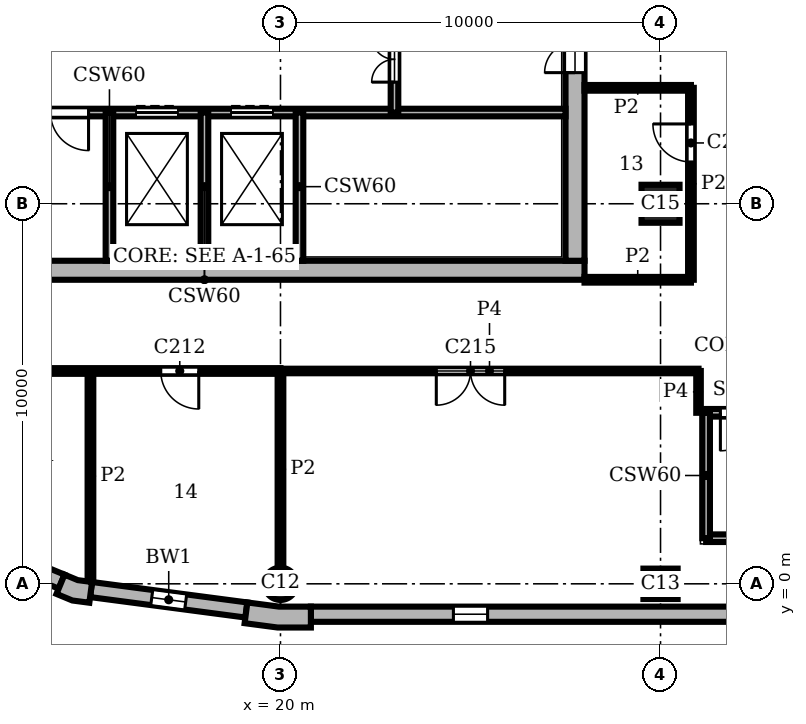
"""IFC4 building model, lengths in metres.
Left out: names, types, materials, properties, quantities, classifications, styles, units other than length and angle.
Written with IfcOpenShell. Run it as: python <this file> out.ifc"""

import sys

from ifc_helpers import new_model, si_unit, direction, frame, frame_2d, origin, origin_2d, place, context, subcontext, project, spatial, polyline, rectangle, circle, outline, extrude, element, fill, save


model = new_model("IFC4")
c1 = context("Model", 3, precision=1e-05, world=origin(), true_north=direction((0.0, 1.0)))
c2 = subcontext(c1, "Body", "Model", "MODEL_VIEW")
j1 = project(units=[si_unit("LENGTHUNIT", "METRE"), si_unit("PLANEANGLEUNIT", "RADIAN")], contexts=[c1])
p1 = place(None, origin())
s1 = spatial("IfcSite", under=j1, at=p1, CompositionType="ELEMENT")
p2 = place(p1, origin())
s2 = spatial("IfcBuilding", under=s1, at=p2, CompositionType="ELEMENT")
p3 = place(p2, frame((0.0, 0.0, 263.1)))
s3 = spatial("IfcBuildingStorey", under=s2, at=p3, CompositionType="ELEMENT", Elevation=263.1)
p4 = place(p3, frame((20.0, 0.0, 0.0), z_axis=(0.0, 0.0, 1.0), x_axis=(1.0, 0.0, 0.0)))
e1 = element("IfcColumn", 1, at=p4, inside=s3, PredefinedType="COLUMN", context=c2, shape_type="SweptSolid", body=[
    extrude(circle(Radius=0.425, at=origin_2d()), origin(), (0.0, 0.0, 1.0), 3.9),
])
p5 = place(p3, frame((30.0, 0.0, 0.0), z_axis=(0.0, 0.0, 1.0), x_axis=(1.0, 0.0, 0.0)))
e2 = element("IfcColumn", 2, at=p5, inside=s3, PredefinedType="COLUMN", context=c2, shape_type="SweptSolid", body=[
    extrude(rectangle(XDim=0.9, YDim=0.8, at=origin_2d()), origin(), (0.0, 0.0, 1.0), 3.9),
])
p6 = place(p3, frame((30.0, 10.0, 0.0), z_axis=(0.0, 0.0, 1.0), x_axis=(1.0, 0.0, 0.0)))
e3 = element("IfcColumn", 3, at=p6, inside=s3, PredefinedType="COLUMN", context=c2, shape_type="SweptSolid", body=[
    extrude(rectangle(XDim=1.0, YDim=1.0, at=origin_2d()), origin(), (0.0, 0.0, 1.0), 3.9),
])
p7 = place(p3, frame((8.0, 8.25, 0.0), z_axis=(0.0, 0.0, 1.0), x_axis=(1.0, 0.0, 0.0)))
e4 = element("IfcWall", 4, at=p7, inside=s3, PredefinedType="SHEAR", context=c2, shape_type="SweptSolid", body=[
    extrude(rectangle(XDim=20.0, YDim=0.5, at=frame_2d((10.0, 0.0))), origin(), (0.0, 0.0, 1.0), 3.9),
])
p8 = place(p3, frame((27.75, 8.5, 0.0), z_axis=(0.0, 0.0, 1.0), x_axis=(0.0, 1.0, 0.0)))
e5 = element("IfcWall", 5, at=p8, inside=s3, PredefinedType="SHEAR", context=c2, shape_type="SweptSolid", body=[
    extrude(rectangle(XDim=19.0, YDim=0.5, at=frame_2d((9.5, 0.0))), origin(), (0.0, 0.0, 1.0), 3.9),
])
p9 = place(p8, frame((4.95, 0.0, 0.0)))
e6 = element("IfcOpeningElement", 6, at=p9, cuts=e5, PredefinedType="OPENING", context=c2, shape_type="SweptSolid", body=[
    extrude(rectangle(XDim=1.6, YDim=2.1, at=frame_2d((0.8, 1.05))), frame((0.0, 0.26, 0.0), z_axis=(0.0, -1.0, 0.0), x_axis=(1.0, 0.0, 0.0)), (0.0, 0.0, 1.0), 0.52),
])
p10 = place(p3, origin())
e7 = element("IfcWall", 7, at=p10, inside=s3, PredefinedType="SOLIDWALL", context=c2, shape_type="SweptSolid", body=[
    extrude(outline(polyline([(19.076, -0.887), (19.057, -1.036), (19.925, -1.15), (20.8, -1.15), (20.8, -1.0), (20.8, -0.6), (19.961, -0.6), (19.128, -0.49), (19.076, -0.887)])), origin(), (0.0, 0.0, 1.0), 3.9),
])
e8 = element("IfcWall", 8, at=p10, inside=s3, PredefinedType="SOLIDWALL", context=c2, shape_type="SweptSolid", body=[
    extrude(outline(polyline([(14.164, -0.128), (14.106, -0.266), (14.523, -0.439), (14.971, -0.498), (14.99, -0.349), (15.043, 0.047), (14.667, 0.097), (14.317, 0.242), (14.164, -0.128)])), origin(), (0.0, 0.0, 1.0), 3.9),
])
p11 = place(p3, frame((20.8, -0.8, 0.0), z_axis=(0.0, 0.0, 1.0), x_axis=(1.0, 0.0, 0.0)))
e9 = element("IfcWall", 9, at=p11, inside=s3, PredefinedType="SOLIDWALL", context=c2, shape_type="SweptSolid", body=[
    extrude(rectangle(XDim=28.4, YDim=0.4, at=frame_2d((14.2, 0.0))), origin(), (0.0, 0.0, 1.0), 3.9),
])
p12 = place(p11, frame((3.75, 0.0, 0.9)))
e10 = element("IfcOpeningElement", 10, at=p12, cuts=e9, PredefinedType="OPENING", context=c2, shape_type="SweptSolid", body=[
    extrude(rectangle(XDim=0.9, YDim=2.35, at=frame_2d((0.45, 1.175))), frame((0.0, 0.21, 0.0), z_axis=(0.0, -1.0, 0.0), x_axis=(1.0, 0.0, 0.0)), (0.0, 0.0, 1.0), 0.42),
])
p13 = place(p11, frame((13.75, 0.0, 0.9)))
e11 = element("IfcOpeningElement", 11, at=p13, cuts=e9, PredefinedType="OPENING", context=c2, shape_type="SweptSolid", body=[
    extrude(rectangle(XDim=0.9, YDim=2.35, at=frame_2d((0.45, 1.175))), frame((0.0, 0.21, 0.0), z_axis=(0.0, -1.0, 0.0), x_axis=(1.0, 0.0, 0.0)), (0.0, 0.0, 1.0), 0.42),
])
p14 = place(p11, frame((23.75, 0.0, 0.9)))
e12 = element("IfcOpeningElement", 12, at=p14, cuts=e9, PredefinedType="OPENING", context=c2, shape_type="SweptSolid", body=[
    extrude(rectangle(XDim=0.9, YDim=2.35, at=frame_2d((0.45, 1.175))), frame((0.0, 0.21, 0.0), z_axis=(0.0, -1.0, 0.0), x_axis=(1.0, 0.0, 0.0)), (0.0, 0.0, 1.0), 0.42),
])
p15 = place(p3, frame((10.433, 1.634, 0.0), z_axis=(0.0, 0.0, 1.0), x_axis=(0.923863744394, -0.382721546029, 0.0)))
e13 = element("IfcWall", 13, at=p15, inside=s3, PredefinedType="SOLIDWALL", context=c2, shape_type="SweptSolid", body=[
    extrude(rectangle(XDim=4.121, YDim=0.4, at=frame_2d((2.061, 0.0))), origin(), (0.0, 0.0, 1.0), 3.9),
])
p16 = place(p15, frame((1.611, 0.0, 0.9)))
e14 = element("IfcOpeningElement", 14, at=p16, cuts=e13, PredefinedType="OPENING", context=c2, shape_type="SweptSolid", body=[
    extrude(rectangle(XDim=0.9, YDim=2.35, at=frame_2d((0.45, 1.175))), frame((0.0, 0.21, 0.0), z_axis=(0.0, -1.0, 0.0), x_axis=(1.0, 0.0, 0.0)), (0.0, 0.0, 1.0), 0.42),
])
p17 = place(p3, frame((15.017, -0.151, 0.0), z_axis=(0.0, 0.0, 1.0), x_axis=(0.991446429508, -0.130514280502, 0.0)))
e15 = element("IfcWall", 15, at=p17, inside=s3, PredefinedType="SOLIDWALL", context=c2, shape_type="SweptSolid", body=[
    extrude(rectangle(XDim=4.121, YDim=0.4, at=frame_2d((2.061, 0.0))), origin(), (0.0, 0.0, 1.0), 3.9),
])
p18 = place(p17, frame((1.611, 0.0, 0.9)))
e16 = element("IfcOpeningElement", 16, at=p18, cuts=e15, PredefinedType="OPENING", context=c2, shape_type="SweptSolid", body=[
    extrude(rectangle(XDim=0.9, YDim=2.35, at=frame_2d((0.45, 1.175))), frame((0.0, 0.21, 0.0), z_axis=(0.0, -1.0, 0.0), x_axis=(1.0, 0.0, 0.0)), (0.0, 0.0, 1.0), 0.42),
])
p19 = place(p3, frame((31.2, 1.2, 0.0), z_axis=(0.0, 0.0, 1.0), x_axis=(1.0, 0.0, 0.0)))
e17 = element("IfcWall", 17, at=p19, inside=s3, PredefinedType="SHEAR", context=c2, shape_type="SweptSolid", body=[
    extrude(rectangle(XDim=6.5, YDim=0.2, at=frame_2d((3.25, 0.0))), origin(), (0.0, 0.0, 1.0), 3.58),
])
p20 = place(p3, frame((31.2, 4.5, 0.0), z_axis=(0.0, 0.0, 1.0), x_axis=(1.0, 0.0, 0.0)))
e18 = element("IfcWall", 18, at=p20, inside=s3, PredefinedType="SHEAR", context=c2, shape_type="SweptSolid", body=[
    extrude(rectangle(XDim=6.5, YDim=0.2, at=frame_2d((3.25, 0.0))), origin(), (0.0, 0.0, 1.0), 3.58),
])
p21 = place(p20, frame((0.375, 0.0, 0.0)))
e19 = element("IfcOpeningElement", 19, at=p21, cuts=e18, PredefinedType="OPENING", context=c2, shape_type="SweptSolid", body=[
    extrude(rectangle(XDim=1.0, YDim=2.1, at=frame_2d((0.5, 1.05))), frame((0.0, 0.11, 0.0), z_axis=(0.0, -1.0, 0.0), x_axis=(1.0, 0.0, 0.0)), (0.0, 0.0, 1.0), 0.22),
])
p22 = place(p3, frame((13.8, 12.4, 0.0), z_axis=(0.0, 0.0, 1.0), x_axis=(1.0, 0.0, 0.0)))
e20 = element("IfcWall", 20, at=p22, inside=s3, PredefinedType="SHEAR", context=c2, shape_type="SweptSolid", body=[
    extrude(rectangle(XDim=13.7, YDim=0.2, at=frame_2d((6.85, 0.0))), origin(), (0.0, 0.0, 1.0), 3.58),
])
p23 = place(p22, frame((2.4, 0.0, 0.0)))
e21 = element("IfcOpeningElement", 21, at=p23, cuts=e20, PredefinedType="OPENING", context=c2, shape_type="SweptSolid", body=[
    extrude(rectangle(XDim=1.1, YDim=2.1, at=frame_2d((0.55, 1.05))), frame((0.0, 0.11, 0.0), z_axis=(0.0, -1.0, 0.0), x_axis=(1.0, 0.0, 0.0)), (0.0, 0.0, 1.0), 0.22),
])
p24 = place(p22, frame((4.9, 0.0, 0.0)))
e22 = element("IfcOpeningElement", 22, at=p24, cuts=e20, PredefinedType="OPENING", context=c2, shape_type="SweptSolid", body=[
    extrude(rectangle(XDim=1.1, YDim=2.1, at=frame_2d((0.55, 1.05))), frame((0.0, 0.11, 0.0), z_axis=(0.0, -1.0, 0.0), x_axis=(1.0, 0.0, 0.0)), (0.0, 0.0, 1.0), 0.22),
])
p25 = place(p22, frame((0.15, 0.0, 0.0)))
e23 = element("IfcOpeningElement", 23, at=p25, cuts=e20, PredefinedType="OPENING", context=c2, shape_type="SweptSolid", body=[
    extrude(rectangle(XDim=1.0, YDim=2.1, at=frame_2d((0.5, 1.05))), frame((0.0, 0.11, 0.0), z_axis=(0.0, -1.0, 0.0), x_axis=(1.0, 0.0, 0.0)), (0.0, 0.0, 1.0), 0.22),
])
for number, where, z_axis, x_axis in (
    (24, (15.5, 8.5, 0.0), (0.0, 0.0, 1.0), (0.0, 1.0, 0.0)),
    (25, (18.0, 8.5, 0.0), (0.0, 0.0, 1.0), (0.0, 1.0, 0.0)),
    (26, (20.5, 8.5, 0.0), (0.0, 0.0, 1.0), (0.0, 1.0, 0.0)),
):
    element("IfcWall", number, at=place(p3, frame(where, z_axis=z_axis, x_axis=x_axis)), inside=s3, PredefinedType="SHEAR", context=c2, shape_type="SweptSolid", body=[
        extrude(rectangle(XDim=3.9, YDim=0.2, at=frame_2d((1.95, 0.0))), origin(), (0.0, 0.0, 1.0), 3.58),
    ])
p26 = place(p3, frame((23.0, 12.4, 0.0), z_axis=(0.0, 0.0, 1.0), x_axis=(0.0, 1.0, 0.0)))
e27 = element("IfcWall", 27, at=p26, inside=s3, PredefinedType="SHEAR", context=c2, shape_type="SweptSolid", body=[
    extrude(rectangle(XDim=2.8, YDim=0.2, at=frame_2d((1.4, 0.0))), origin(), (0.0, 0.0, 1.0), 3.58),
])
p27 = place(p26, frame((0.8, 0.0, 0.0)))
e28 = element("IfcOpeningElement", 28, at=p27, cuts=e27, PredefinedType="OPENING", context=c2, shape_type="SweptSolid", body=[
    extrude(rectangle(XDim=1.2, YDim=2.1, at=frame_2d((0.6, 1.05))), frame((0.0, 0.11, 0.0), z_axis=(0.0, -1.0, 0.0), x_axis=(1.0, 0.0, 0.0)), (0.0, 0.0, 1.0), 0.22),
])
p28 = place(p3, frame((31.2, 1.2, 0.0), z_axis=(0.0, 0.0, 1.0), x_axis=(0.0, 1.0, 0.0)))
e29 = element("IfcWall", 29, at=p28, inside=s3, PredefinedType="SHEAR", context=c2, shape_type="SweptSolid", body=[
    extrude(rectangle(XDim=3.3, YDim=0.2, at=frame_2d((1.65, 0.0))), origin(), (0.0, 0.0, 1.0), 3.58),
])
p29 = place(p3, frame((15.0, 0.063, 0.0), z_axis=(0.0, 0.0, 1.0), x_axis=(0.0, 1.0, 0.0)))
e30 = element("IfcWall", 30, at=p29, inside=s3, PredefinedType="PARTITIONING", context=c2, shape_type="SweptSolid", body=[
    extrude(rectangle(XDim=5.537, YDim=0.15, at=frame_2d((2.769, 0.0))), origin(), (0.0, 0.0, 1.0), 3.58),
])
p30 = place(p3, frame((20.0, 0.425, 0.0), z_axis=(0.0, 0.0, 1.0), x_axis=(0.0, 1.0, 0.0)))
e31 = element("IfcWall", 31, at=p30, inside=s3, PredefinedType="PARTITIONING", context=c2, shape_type="SweptSolid", body=[
    extrude(rectangle(XDim=5.175, YDim=0.15, at=frame_2d((2.587, 0.0))), origin(), (0.0, 0.0, 1.0), 3.58),
])
p31 = place(p3, frame((30.8, 8.0, 0.0), z_axis=(0.0, 0.0, 1.0), x_axis=(0.0, 1.0, 0.0)))
e32 = element("IfcWall", 32, at=p31, inside=s3, PredefinedType="PARTITIONING", context=c2, shape_type="SweptSolid", body=[
    extrude(rectangle(XDim=5.05, YDim=0.15, at=frame_2d((2.525, 0.0))), origin(), (0.0, 0.0, 1.0), 3.58),
])
p32 = place(p31, frame((3.1, 0.0, 0.0)))
e33 = element("IfcOpeningElement", 33, at=p32, cuts=e32, PredefinedType="OPENING", context=c2, shape_type="SweptSolid", body=[
    extrude(rectangle(XDim=1.0, YDim=2.1, at=frame_2d((0.5, 1.05))), frame((0.0, 0.085, 0.0), z_axis=(0.0, -1.0, 0.0), x_axis=(1.0, 0.0, 0.0)), (0.0, 0.0, 1.0), 0.17),
])
p33 = place(p3, frame((5.6, 5.6, 0.0), z_axis=(0.0, 0.0, 1.0), x_axis=(1.0, 0.0, 0.0)))
e34 = element("IfcWall", 34, at=p33, inside=s3, PredefinedType="PARTITIONING", context=c2, shape_type="SweptSolid", body=[
    extrude(rectangle(XDim=14.4, YDim=0.15, at=frame_2d((7.2, 0.0))), origin(), (0.0, 0.0, 1.0), 3.58),
])
p34 = place(p33, frame((4.6, 0.0, 0.0)))
e35 = element("IfcOpeningElement", 35, at=p34, cuts=e34, PredefinedType="OPENING", context=c2, shape_type="SweptSolid", body=[
    extrude(rectangle(XDim=0.8, YDim=2.1, at=frame_2d((0.4, 1.05))), frame((0.0, 0.085, 0.0), z_axis=(0.0, -1.0, 0.0), x_axis=(1.0, 0.0, 0.0)), (0.0, 0.0, 1.0), 0.17),
])
p35 = place(p33, frame((11.25, 0.0, 0.0)))
e36 = element("IfcOpeningElement", 36, at=p35, cuts=e34, PredefinedType="OPENING", context=c2, shape_type="SweptSolid", body=[
    extrude(rectangle(XDim=1.0, YDim=2.1, at=frame_2d((0.5, 1.05))), frame((0.0, 0.085, 0.0), z_axis=(0.0, -1.0, 0.0), x_axis=(1.0, 0.0, 0.0)), (0.0, 0.0, 1.0), 0.17),
])
for number, where, z_axis, x_axis in (
    (37, (28.0, 8.0, 0.0), (0.0, 0.0, 1.0), (1.0, 0.0, 0.0)),
    (38, (28.0, 13.05, 0.0), (0.0, 0.0, 1.0), (1.0, 0.0, 0.0)),
):
    element("IfcWall", number, at=place(p3, frame(where, z_axis=z_axis, x_axis=x_axis)), inside=s3, PredefinedType="PARTITIONING", context=c2, shape_type="SweptSolid", body=[
        extrude(rectangle(XDim=2.8, YDim=0.15, at=frame_2d((1.4, 0.0))), origin(), (0.0, 0.0, 1.0), 3.58),
    ])
p36 = place(p3, frame((31.0, 4.5, 0.0), z_axis=(0.0, 0.0, 1.0), x_axis=(0.0, 1.0, 0.0)))
e39 = element("IfcWall", 39, at=p36, inside=s3, PredefinedType="PARTITIONING", context=c2, shape_type="SweptSolid", body=[
    extrude(rectangle(XDim=1.1, YDim=0.12, at=frame_2d((0.55, 0.0))), origin(), (0.0, 0.0, 1.0), 3.58),
])
p37 = place(p3, frame((20.0, 5.6, 0.0), z_axis=(0.0, 0.0, 1.0), x_axis=(1.0, 0.0, 0.0)))
e40 = element("IfcWall", 40, at=p37, inside=s3, PredefinedType="PARTITIONING", context=c2, shape_type="SweptSolid", body=[
    extrude(rectangle(XDim=11.0, YDim=0.12, at=frame_2d((5.5, 0.0))), origin(), (0.0, 0.0, 1.0), 3.58),
])
p38 = place(p37, frame((4.1, 0.0, 0.0)))
e41 = element("IfcOpeningElement", 41, at=p38, cuts=e40, PredefinedType="OPENING", context=c2, shape_type="SweptSolid", body=[
    extrude(rectangle(XDim=1.8, YDim=2.1, at=frame_2d((0.9, 1.05))), frame((0.0, 0.07, 0.0), z_axis=(0.0, -1.0, 0.0), x_axis=(1.0, 0.0, 0.0)), (0.0, 0.0, 1.0), 0.14),
])
p39 = place(p12, origin())
e42 = element("IfcWindow", 42, at=p39, inside=s3, PartitioningType="SINGLE_PANEL", PredefinedType="WINDOW", context=c2, shape_type="SweptSolid", body=[
    extrude(rectangle(XDim=0.9, YDim=2.35, at=frame_2d((0.45, 1.175))), frame((0.0, 0.16, 0.0), z_axis=(0.0, -1.0, 0.0), x_axis=(1.0, 0.0, 0.0)), (0.0, 0.0, 1.0), 0.06),
])
fill(e10, e42)
p40 = place(p18, origin())
e43 = element("IfcWindow", 43, at=p40, inside=s3, PartitioningType="SINGLE_PANEL", PredefinedType="WINDOW", context=c2, shape_type="SweptSolid", body=[
    extrude(rectangle(XDim=0.9, YDim=2.35, at=frame_2d((0.45, 1.175))), frame((0.0, 0.16, 0.0), z_axis=(0.0, -1.0, 0.0), x_axis=(1.0, 0.0, 0.0)), (0.0, 0.0, 1.0), 0.06),
])
fill(e16, e43)
p41 = place(p23, origin())
e44 = element("IfcDoor", 44, at=p41, inside=s3, OperationType="DOUBLE_DOOR_SLIDING", PredefinedType="DOOR", context=c2, shape_type="SweptSolid", body=[
    extrude(rectangle(XDim=1.1, YDim=2.1, at=frame_2d((0.55, 1.05))), frame((0.0, 0.025, 0.0), z_axis=(0.0, -1.0, 0.0), x_axis=(1.0, 0.0, 0.0)), (0.0, 0.0, 1.0), 0.05),
])
fill(e21, e44)
p42 = place(p24, origin())
e45 = element("IfcDoor", 45, at=p42, inside=s3, OperationType="DOUBLE_DOOR_SLIDING", PredefinedType="DOOR", context=c2, shape_type="SweptSolid", body=[
    extrude(rectangle(XDim=1.1, YDim=2.1, at=frame_2d((0.55, 1.05))), frame((0.0, 0.025, 0.0), z_axis=(0.0, -1.0, 0.0), x_axis=(1.0, 0.0, 0.0)), (0.0, 0.0, 1.0), 0.05),
])
fill(e22, e45)
p43 = place(p25, frame((1.0, 0.0, 0.0), z_axis=(0.0, 0.0, 1.0), x_axis=(-1.0, 0.0, 0.0)))
e46 = element("IfcDoor", 46, at=p43, inside=s3, OperationType="SINGLE_SWING_LEFT", PredefinedType="DOOR", context=c2, shape_type="SweptSolid", body=[
    extrude(rectangle(XDim=1.0, YDim=2.1, at=frame_2d((0.5, 1.05))), frame((0.0, 0.025, 0.0), z_axis=(0.0, -1.0, 0.0), x_axis=(1.0, 0.0, 0.0)), (0.0, 0.0, 1.0), 0.05),
])
fill(e23, e46)
p44 = place(p21, frame((1.0, 0.0, 0.0), z_axis=(0.0, 0.0, 1.0), x_axis=(-1.0, 0.0, 0.0)))
e47 = element("IfcDoor", 47, at=p44, inside=s3, OperationType="SINGLE_SWING_RIGHT", PredefinedType="DOOR", context=c2, shape_type="SweptSolid", body=[
    extrude(rectangle(XDim=1.0, YDim=2.1, at=frame_2d((0.5, 1.05))), frame((0.0, 0.025, 0.0), z_axis=(0.0, -1.0, 0.0), x_axis=(1.0, 0.0, 0.0)), (0.0, 0.0, 1.0), 0.05),
])
fill(e19, e47)
p45 = place(p27, origin())
e48 = element("IfcDoor", 48, at=p45, inside=s3, OperationType="DOUBLE_DOOR_SINGLE_SWING", PredefinedType="DOOR", context=c2, shape_type="SweptSolid", body=[
    extrude(rectangle(XDim=1.2, YDim=2.1, at=frame_2d((0.6, 1.05))), frame((0.0, 0.025, 0.0), z_axis=(0.0, -1.0, 0.0), x_axis=(1.0, 0.0, 0.0)), (0.0, 0.0, 1.0), 0.05),
])
fill(e28, e48)
p46 = place(p9, origin())
e49 = element("IfcDoor", 49, at=p46, inside=s3, OperationType="DOUBLE_DOOR_SINGLE_SWING", PredefinedType="DOOR", context=c2, shape_type="SweptSolid", body=[
    extrude(rectangle(XDim=1.6, YDim=2.1, at=frame_2d((0.8, 1.05))), frame((0.0, 0.025, 0.0), z_axis=(0.0, -1.0, 0.0), x_axis=(1.0, 0.0, 0.0)), (0.0, 0.0, 1.0), 0.05),
])
fill(e6, e49)
p47 = place(p35, frame((1.0, 0.0, 0.0), z_axis=(0.0, 0.0, 1.0), x_axis=(-1.0, 0.0, 0.0)))
e50 = element("IfcDoor", 50, at=p47, inside=s3, OperationType="SINGLE_SWING_LEFT", PredefinedType="DOOR", context=c2, shape_type="SweptSolid", body=[
    extrude(rectangle(XDim=1.0, YDim=2.1, at=frame_2d((0.5, 1.05))), frame((0.0, 0.025, 0.0), z_axis=(0.0, -1.0, 0.0), x_axis=(1.0, 0.0, 0.0)), (0.0, 0.0, 1.0), 0.05),
])
fill(e36, e50)
p48 = place(p38, frame((1.8, 0.0, 0.0), z_axis=(0.0, 0.0, 1.0), x_axis=(-1.0, 0.0, 0.0)))
e51 = element("IfcDoor", 51, at=p48, inside=s3, OperationType="DOUBLE_DOOR_SINGLE_SWING", PredefinedType="DOOR", context=c2, shape_type="SweptSolid", body=[
    extrude(rectangle(XDim=1.8, YDim=2.1, at=frame_2d((0.9, 1.05))), frame((0.0, 0.025, 0.0), z_axis=(0.0, -1.0, 0.0), x_axis=(1.0, 0.0, 0.0)), (0.0, 0.0, 1.0), 0.05),
])
fill(e41, e51)
p49 = place(p32, origin())
e52 = element("IfcDoor", 52, at=p49, inside=s3, OperationType="SINGLE_SWING_RIGHT", PredefinedType="DOOR", context=c2, shape_type="SweptSolid", body=[
    extrude(rectangle(XDim=1.0, YDim=2.1, at=frame_2d((0.5, 1.05))), frame((0.0, 0.025, 0.0), z_axis=(0.0, -1.0, 0.0), x_axis=(1.0, 0.0, 0.0)), (0.0, 0.0, 1.0), 0.05),
])
fill(e33, e52)
save(model, sys.argv[1])
